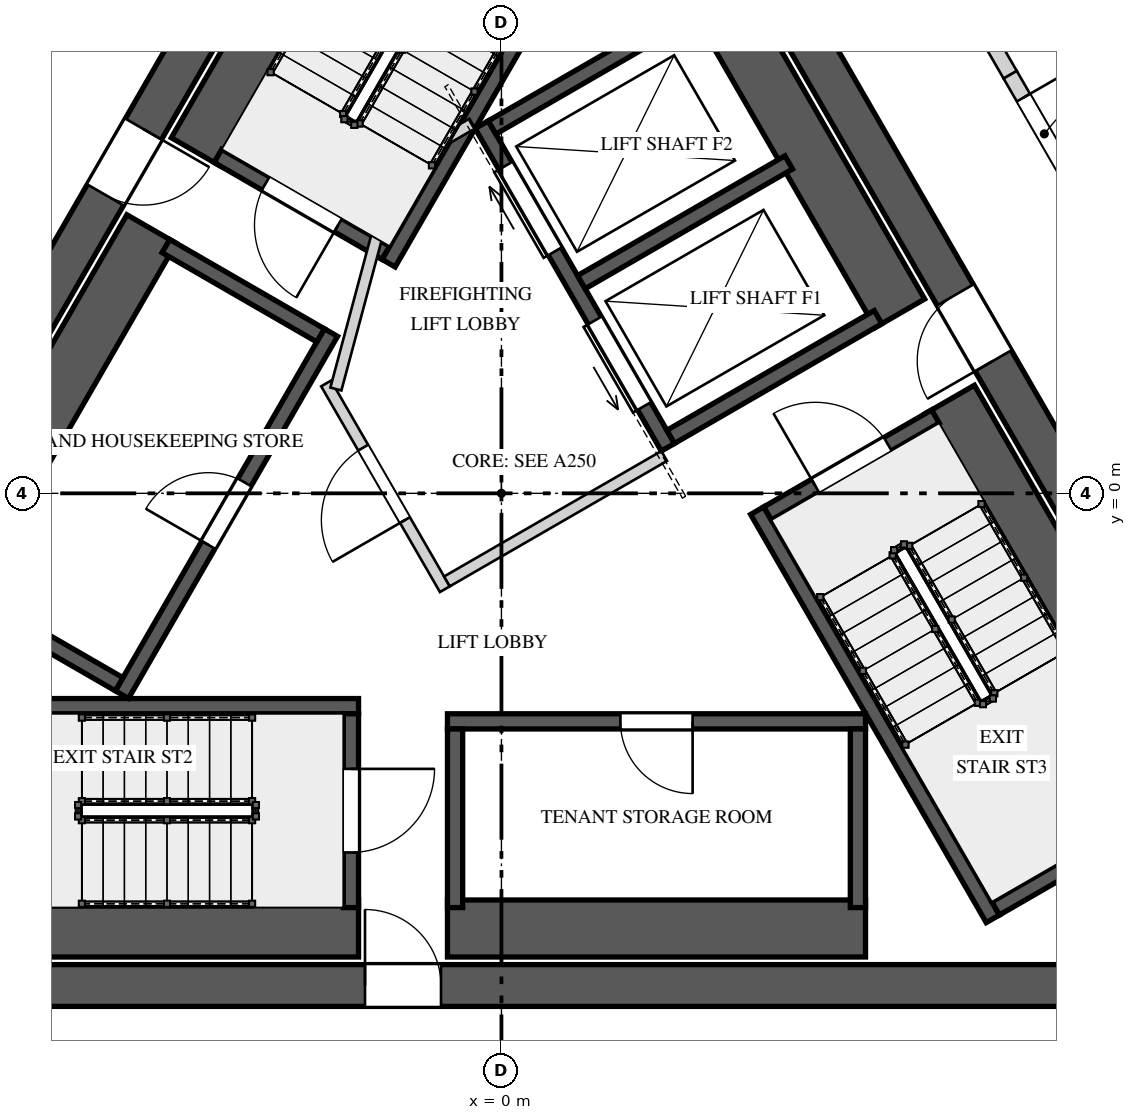
"""IFC4 building model, lengths in metres.
Left out: names, types, materials, properties, quantities, classifications, styles, units other than length and angle.
Written with IfcOpenShell. Run it as: python <this file> out.ifc"""

import sys

from ifc_helpers import new_model, si_unit, direction, frame, frame_2d, origin, place, context, subcontext, project, spatial, polyline, rectangle, outline, extrude, element, fill, save


model = new_model("IFC4")
c1 = context("Model", 3, precision=1e-05, world=origin(), true_north=direction((0.0, 1.0)))
c2 = subcontext(c1, "Body", "Model", "MODEL_VIEW")
j1 = project(units=[si_unit("LENGTHUNIT", "METRE"), si_unit("PLANEANGLEUNIT", "RADIAN")], contexts=[c1])
p1 = place(None, origin())
s1 = spatial("IfcSite", under=j1, at=p1, CompositionType="ELEMENT")
p2 = place(p1, origin())
s2 = spatial("IfcBuilding", under=s1, at=p2, CompositionType="ELEMENT")
p3 = place(p2, frame((0.0, 0.0, 374.9)))
s3 = spatial("IfcBuildingStorey", under=s2, at=p3, CompositionType="ELEMENT", Elevation=374.9)
p4 = place(p3, frame((-1.285, 10.725, 0.0), z_axis=(0.0, 0.0, 1.0), x_axis=(-0.499994590896, -0.86602852671, 0.0)))
e1 = element("IfcWall", 1, at=p4, inside=s3, PredefinedType="SHEAR", context=c2, shape_type="SweptSolid", body=[
    extrude(rectangle(XDim=17.292, YDim=0.55, at=frame_2d((8.646, 0.0))), origin(), (0.0, 0.0, 1.0), 6.0),
])
p5 = place(p4, frame((6.851, 0.0, 0.0)))
e2 = element("IfcOpeningElement", 2, at=p5, cuts=e1, PredefinedType="OPENING", context=c2, shape_type="SweptSolid", body=[
    extrude(rectangle(XDim=1.0, YDim=2.4, at=frame_2d((0.5, 1.2))), frame((0.0, 0.285, 0.0), z_axis=(0.0, -1.0, 0.0), x_axis=(1.0, 0.0, 0.0)), (0.0, 0.0, 1.0), 0.57),
])
p6 = place(p4, frame((15.089, 0.0, 0.0)))
e3 = element("IfcOpeningElement", 3, at=p6, cuts=e1, PredefinedType="OPENING", context=c2, shape_type="SweptSolid", body=[
    extrude(rectangle(XDim=0.8, YDim=2.1, at=frame_2d((0.4, 1.05))), frame((0.0, 0.285, 0.0), z_axis=(0.0, -1.0, 0.0), x_axis=(1.0, 0.0, 0.0)), (0.0, 0.0, 1.0), 0.57),
])
p7 = place(p3, frame((-8.646, -6.475, 0.0), z_axis=(0.0, 0.0, 1.0), x_axis=(1.0, 0.0, 0.0)))
e4 = element("IfcWall", 4, at=p7, inside=s3, PredefinedType="SHEAR", context=c2, shape_type="SweptSolid", body=[
    extrude(rectangle(XDim=17.292, YDim=0.55, at=frame_2d((8.646, 0.0))), origin(), (0.0, 0.0, 1.0), 6.0),
])
p8 = place(p7, frame((6.851, 0.0, 0.0)))
e5 = element("IfcOpeningElement", 5, at=p8, cuts=e4, PredefinedType="OPENING", context=c2, shape_type="SweptSolid", body=[
    extrude(rectangle(XDim=1.0, YDim=2.4, at=frame_2d((0.5, 1.2))), frame((0.0, 0.285, 0.0), z_axis=(0.0, -1.0, 0.0), x_axis=(1.0, 0.0, 0.0)), (0.0, 0.0, 1.0), 0.57),
])
p9 = place(p3, frame((9.93, -4.25, 0.0), z_axis=(0.0, 0.0, 1.0), x_axis=(-0.499994590896, 0.86602852671, 0.0)))
e6 = element("IfcWall", 6, at=p9, inside=s3, PredefinedType="SHEAR", context=c2, shape_type="SweptSolid", body=[
    extrude(rectangle(XDim=17.292, YDim=0.55, at=frame_2d((8.646, 0.0))), origin(), (0.0, 0.0, 1.0), 6.0),
])
p10 = place(p9, frame((6.921, 0.0, 0.0)))
e7 = element("IfcOpeningElement", 7, at=p10, cuts=e6, PredefinedType="OPENING", context=c2, shape_type="SweptSolid", body=[
    extrude(rectangle(XDim=1.0, YDim=2.4, at=frame_2d((0.5, 1.2))), frame((0.0, 0.285, 0.0), z_axis=(0.0, -1.0, 0.0), x_axis=(1.0, 0.0, 0.0)), (0.0, 0.0, 1.0), 0.57),
])
p11 = place(p3, frame((-0.918, 9.86, 0.0), z_axis=(0.0, 0.0, 1.0), x_axis=(-0.500026960575, -0.86600983753, 0.0)))
e8 = element("IfcWall", 8, at=p11, inside=s3, PredefinedType="SOLIDWALL", context=c2, shape_type="SweptSolid", body=[
    extrude(rectangle(XDim=6.2, YDim=0.75, at=frame_2d((3.1, 0.0))), origin(), (0.0, 0.0, 1.0), 5.65),
])
p12 = place(p3, frame((1.615, 8.397, 0.0), z_axis=(0.0, 0.0, 1.0), x_axis=(-0.500009909098, -0.866019682689, 0.0)))
e9 = element("IfcWall", 9, at=p12, inside=s3, PredefinedType="SOLIDWALL", context=c2, shape_type="SweptSolid", body=[
    extrude(rectangle(XDim=6.2, YDim=0.2, at=frame_2d((3.1, 0.0))), origin(), (0.0, 0.0, 1.0), 5.65),
])
p13 = place(p3, frame((-1.521, 3.165, 0.0), z_axis=(0.0, 0.0, 1.0), x_axis=(-0.866030925526, 0.499990435942, 0.0)))
e10 = element("IfcWall", 10, at=p13, inside=s3, PredefinedType="SOLIDWALL", context=c2, shape_type="SweptSolid", body=[
    extrude(rectangle(XDim=2.55, YDim=0.2, at=frame_2d((1.275, 0.0))), origin(), (0.0, 0.0, 1.0), 5.65),
])
p14 = place(p13, frame((0.725, 0.0, 0.0)))
e11 = element("IfcOpeningElement", 11, at=p14, cuts=e10, PredefinedType="OPENING", context=c2, shape_type="SweptSolid", body=[
    extrude(rectangle(XDim=1.1, YDim=2.4, at=frame_2d((0.55, 1.2))), frame((0.0, 0.11, 0.0), z_axis=(0.0, -1.0, 0.0), x_axis=(1.0, 0.0, 0.0)), (0.0, 0.0, 1.0), 0.22),
])
p15 = place(p3, frame((-8.08, -5.725, 0.0), z_axis=(0.0, 0.0, 1.0), x_axis=(1.0, 0.0, 0.0)))
e12 = element("IfcWall", 12, at=p15, inside=s3, PredefinedType="SOLIDWALL", context=c2, shape_type="SweptSolid", body=[
    extrude(rectangle(XDim=6.2, YDim=0.75, at=frame_2d((3.1, 0.0))), origin(), (0.0, 0.0, 1.0), 5.65),
])
p16 = place(p3, frame((-8.08, -2.8, 0.0), z_axis=(0.0, 0.0, 1.0), x_axis=(1.0, 0.0, 0.0)))
e13 = element("IfcWall", 13, at=p16, inside=s3, PredefinedType="SOLIDWALL", context=c2, shape_type="SweptSolid", body=[
    extrude(rectangle(XDim=6.2, YDim=0.2, at=frame_2d((3.1, 0.0))), origin(), (0.0, 0.0, 1.0), 5.65),
])
p17 = place(p3, frame((-1.98, -2.9, 0.0), z_axis=(0.0, 0.0, 1.0), x_axis=(0.0, -1.0, 0.0)))
e14 = element("IfcWall", 14, at=p17, inside=s3, PredefinedType="SOLIDWALL", context=c2, shape_type="SweptSolid", body=[
    extrude(rectangle(XDim=2.55, YDim=0.2, at=frame_2d((1.275, 0.0))), origin(), (0.0, 0.0, 1.0), 5.65),
])
p18 = place(p17, frame((0.725, 0.0, 0.0)))
e15 = element("IfcOpeningElement", 15, at=p18, cuts=e14, PredefinedType="OPENING", context=c2, shape_type="SweptSolid", body=[
    extrude(rectangle(XDim=1.1, YDim=2.4, at=frame_2d((0.55, 1.2))), frame((0.0, 0.11, 0.0), z_axis=(0.0, -1.0, 0.0), x_axis=(1.0, 0.0, 0.0)), (0.0, 0.0, 1.0), 0.22),
])
p19 = place(p3, frame((8.998, -4.135, 0.0), z_axis=(0.0, 0.0, 1.0), x_axis=(-0.500009909098, 0.866019682689, 0.0)))
e16 = element("IfcWall", 16, at=p19, inside=s3, PredefinedType="SOLIDWALL", context=c2, shape_type="SweptSolid", body=[
    extrude(rectangle(XDim=6.2, YDim=0.75, at=frame_2d((3.1, 0.0))), origin(), (0.0, 0.0, 1.0), 5.65),
])
p20 = place(p3, frame((6.465, -5.597, 0.0), z_axis=(0.0, 0.0, 1.0), x_axis=(-0.49998037582, 0.866036733513, 0.0)))
e17 = element("IfcWall", 17, at=p20, inside=s3, PredefinedType="SOLIDWALL", context=c2, shape_type="SweptSolid", body=[
    extrude(rectangle(XDim=6.2, YDim=0.2, at=frame_2d((3.1, 0.0))), origin(), (0.0, 0.0, 1.0), 5.65),
])
p21 = place(p3, frame((6.501, -5.461, 0.0), z_axis=(0.0, 0.0, 1.0), x_axis=(0.865989465428, 0.500062241894, 0.0)))
e18 = element("IfcWall", 18, at=p21, inside=s3, PredefinedType="SOLIDWALL", context=c2, shape_type="SweptSolid", body=[
    extrude(rectangle(XDim=2.55, YDim=0.2, at=frame_2d((1.275, 0.0))), origin(), (0.0, 0.0, 1.0), 5.65),
])
p22 = place(p3, frame((3.501, -0.265, 0.0), z_axis=(0.0, 0.0, 1.0), x_axis=(0.866030925526, 0.499990435942, 0.0)))
e19 = element("IfcWall", 19, at=p22, inside=s3, PredefinedType="SOLIDWALL", context=c2, shape_type="SweptSolid", body=[
    extrude(rectangle(XDim=2.55, YDim=0.2, at=frame_2d((1.275, 0.0))), origin(), (0.0, 0.0, 1.0), 5.65),
])
p23 = place(p22, frame((0.725, 0.0, 0.0)))
e20 = element("IfcOpeningElement", 20, at=p23, cuts=e19, PredefinedType="OPENING", context=c2, shape_type="SweptSolid", body=[
    extrude(rectangle(XDim=1.1, YDim=2.4, at=frame_2d((0.55, 1.2))), frame((0.0, 0.11, 0.0), z_axis=(0.0, -1.0, 0.0), x_axis=(1.0, 0.0, 0.0)), (0.0, 0.0, 1.0), 0.22),
])
p24 = place(p3, frame((-4.993, -2.648, 0.0), z_axis=(0.0, 0.0, 1.0), x_axis=(0.499996545922, 0.866027397988, 0.0)))
e21 = element("IfcWall", 21, at=p24, inside=s3, PredefinedType="SOLIDWALL", context=c2, shape_type="SweptSolid", body=[
    extrude(rectangle(XDim=5.5, YDim=0.2, at=frame_2d((2.75, 0.0))), origin(), (0.0, 0.0, 1.0), 5.65),
])
p25 = place(p24, frame((2.275, 0.0, 0.0)))
e22 = element("IfcOpeningElement", 22, at=p25, cuts=e21, PredefinedType="OPENING", context=c2, shape_type="SweptSolid", body=[
    extrude(rectangle(XDim=0.95, YDim=2.4, at=frame_2d((0.475, 1.2))), frame((0.0, 0.11, 0.0), z_axis=(0.0, -1.0, 0.0), x_axis=(1.0, 0.0, 0.0)), (0.0, 0.0, 1.0), 0.22),
])
p26 = place(p3, frame((-4.603, 3.477, 0.0), z_axis=(0.0, 0.0, 1.0), x_axis=(-0.500015767406, -0.866016300277, 0.0)))
e23 = element("IfcWall", 23, at=p26, inside=s3, PredefinedType="SOLIDWALL", context=c2, shape_type="SweptSolid", body=[
    extrude(rectangle(XDim=5.5, YDim=0.75, at=frame_2d((2.75, 0.0))), origin(), (0.0, 0.0, 1.0), 5.65),
])
p27 = place(p3, frame((-2.38, 2.078, 0.0), z_axis=(0.0, 0.0, 1.0), x_axis=(-0.866061024631, 0.499938297808, 0.0)))
e24 = element("IfcWall", 24, at=p27, inside=s3, PredefinedType="SOLIDWALL", context=c2, shape_type="SweptSolid", body=[
    extrude(rectangle(XDim=2.35, YDim=0.2, at=frame_2d((1.175, 0.0))), origin(), (0.0, 0.0, 1.0), 5.65),
])
p28 = place(p3, frame((-5.03, -2.512, 0.0), z_axis=(0.0, 0.0, 1.0), x_axis=(-0.866016039709, 0.500016218704, 0.0)))
e25 = element("IfcWall", 25, at=p28, inside=s3, PredefinedType="SOLIDWALL", context=c2, shape_type="SweptSolid", body=[
    extrude(rectangle(XDim=2.35, YDim=0.2, at=frame_2d((1.175, 0.0))), origin(), (0.0, 0.0, 1.0), 5.65),
])
p29 = place(p3, frame((4.79, -3.0, 0.0), z_axis=(0.0, 0.0, 1.0), x_axis=(-1.0, 0.0, 0.0)))
e26 = element("IfcWall", 26, at=p29, inside=s3, PredefinedType="SOLIDWALL", context=c2, shape_type="SweptSolid", body=[
    extrude(rectangle(XDim=5.5, YDim=0.2, at=frame_2d((2.75, 0.0))), origin(), (0.0, 0.0, 1.0), 5.65),
])
p30 = place(p29, frame((2.275, 0.0, 0.0)))
e27 = element("IfcOpeningElement", 27, at=p30, cuts=e26, PredefinedType="OPENING", context=c2, shape_type="SweptSolid", body=[
    extrude(rectangle(XDim=0.95, YDim=2.4, at=frame_2d((0.475, 1.2))), frame((0.0, 0.11, 0.0), z_axis=(0.0, -1.0, 0.0), x_axis=(1.0, 0.0, 0.0)), (0.0, 0.0, 1.0), 0.22),
])
p31 = place(p3, frame((-0.71, -5.725, 0.0), z_axis=(0.0, 0.0, 1.0), x_axis=(1.0, 0.0, 0.0)))
e28 = element("IfcWall", 28, at=p31, inside=s3, PredefinedType="SOLIDWALL", context=c2, shape_type="SweptSolid", body=[
    extrude(rectangle(XDim=5.5, YDim=0.75, at=frame_2d((2.75, 0.0))), origin(), (0.0, 0.0, 1.0), 5.65),
])
for number, where, z_axis, x_axis in (
    (29, (-0.61, -3.1, 0.0), (0.0, 0.0, 1.0), (0.0, -1.0, 0.0)),
    (30, (4.69, -3.1, 0.0), (0.0, 0.0, 1.0), (0.0, -1.0, 0.0)),
):
    element("IfcWall", number, at=place(p3, frame(where, z_axis=z_axis, x_axis=x_axis)), inside=s3, PredefinedType="SOLIDWALL", context=c2, shape_type="SweptSolid", body=[
        extrude(rectangle(XDim=2.35, YDim=0.2, at=frame_2d((1.175, 0.0))), origin(), (0.0, 0.0, 1.0), 5.65),
    ])
p32 = place(p3, frame((2.19, 0.606, 0.0), z_axis=(0.0, 0.0, 1.0), x_axis=(-0.500002801628, 0.866023786258, 0.0)))
e31 = element("IfcWall", 31, at=p32, inside=s3, PredefinedType="SOLIDWALL", context=c2, shape_type="SweptSolid", body=[
    extrude(rectangle(XDim=4.9, YDim=0.2, at=frame_2d((2.45, 0.0))), origin(), (0.0, 0.0, 1.0), 5.65),
])
p33 = place(p32, frame((0.625, 0.0, 0.0)))
e32 = element("IfcOpeningElement", 32, at=p33, cuts=e31, PredefinedType="OPENING", context=c2, shape_type="SweptSolid", body=[
    extrude(rectangle(XDim=1.3, YDim=2.1, at=frame_2d((0.65, 1.05))), frame((0.0, 0.11, 0.0), z_axis=(0.0, -1.0, 0.0), x_axis=(1.0, 0.0, 0.0)), (0.0, 0.0, 1.0), 0.22),
])
p34 = place(p32, frame((2.975, 0.0, 0.0)))
e33 = element("IfcOpeningElement", 33, at=p34, cuts=e31, PredefinedType="OPENING", context=c2, shape_type="SweptSolid", body=[
    extrude(rectangle(XDim=1.3, YDim=2.1, at=frame_2d((0.65, 1.05))), frame((0.0, 0.11, 0.0), z_axis=(0.0, -1.0, 0.0), x_axis=(1.0, 0.0, 0.0)), (0.0, 0.0, 1.0), 0.22),
])
p35 = place(p3, frame((5.243, 2.369, 0.0), z_axis=(0.0, 0.0, 1.0), x_axis=(-0.500002801628, 0.866023786258, 0.0)))
e34 = element("IfcWall", 34, at=p35, inside=s3, PredefinedType="SOLIDWALL", context=c2, shape_type="SweptSolid", body=[
    extrude(rectangle(XDim=4.9, YDim=0.75, at=frame_2d((2.45, 0.0))), origin(), (0.0, 0.0, 1.0), 5.65),
])
for number, where, z_axis, x_axis in (
    (35, (2.227, 0.743, 0.0), (0.0, 0.0, 1.0), (0.866, 0.5, 0.0)),
    (36, (1.052, 2.778, 0.0), (0.0, 0.0, 1.0), (0.866, 0.5, 0.0)),
    (37, (-0.123, 4.813, 0.0), (0.0, 0.0, 1.0), (0.866, 0.5, 0.0)),
):
    element("IfcWall", number, at=place(p3, frame(where, z_axis=z_axis, x_axis=x_axis)), inside=s3, PredefinedType="SOLIDWALL", context=c2, shape_type="SweptSolid", body=[
        extrude(rectangle(XDim=3.15, YDim=0.2, at=frame_2d((1.575, 0.0))), origin(), (0.0, 0.0, 1.0), 5.65),
    ])
p36 = place(p3, frame((-0.744, -1.261, 0.0), z_axis=(0.0, 0.0, 1.0), x_axis=(-0.500004234368, 0.866022959057, 0.0)))
e38 = element("IfcWall", 38, at=p36, inside=s3, PredefinedType="PARTITIONING", context=c2, shape_type="SweptSolid", body=[
    extrude(rectangle(XDim=3.125, YDim=0.15, at=frame_2d((1.562, 0.0))), origin(), (0.0, 0.0, 1.0), 5.65),
])
p37 = place(p36, frame((1.05, 0.0, 0.0)))
e39 = element("IfcOpeningElement", 39, at=p37, cuts=e38, PredefinedType="OPENING", context=c2, shape_type="SweptSolid", body=[
    extrude(rectangle(XDim=1.1, YDim=2.4, at=frame_2d((0.55, 1.2))), frame((0.0, 0.085, 0.0), z_axis=(0.0, -1.0, 0.0), x_axis=(1.0, 0.0, 0.0)), (0.0, 0.0, 1.0), 0.17),
])
p38 = place(p3, frame((-0.717, -1.159, 0.0), z_axis=(0.0, 0.0, 1.0), x_axis=(0.866008176907, 0.50002983664, 0.0)))
e40 = element("IfcWall", 40, at=p38, inside=s3, PredefinedType="PARTITIONING", context=c2, shape_type="SweptSolid", body=[
    extrude(rectangle(XDim=3.3, YDim=0.15, at=frame_2d((1.65, 0.0))), origin(), (0.0, 0.0, 1.0), 5.65),
])
p39 = place(p3, frame((-2.178, 1.372, 0.0), z_axis=(0.0, 0.0, 1.0), x_axis=(0.258808958833, 0.96592852884, 0.0)))
e41 = element("IfcWall", 41, at=p39, inside=s3, PredefinedType="PARTITIONING", context=c2, shape_type="SweptSolid", body=[
    extrude(rectangle(XDim=2.903, YDim=0.15, at=frame_2d((1.451, 0.0))), origin(), (0.0, 0.0, 1.0), 5.65),
])
p40 = place(p3, frame((-1.51, 4.215, 0.0), z_axis=(0.0, 0.0, 1.0), x_axis=(0.866085525409, 0.49989585183, 0.0)))
e42 = element("IfcWall", 42, at=p40, inside=s3, PredefinedType="PARTITIONING", context=c2, shape_type="SweptSolid", body=[
    extrude(rectangle(XDim=1.3, YDim=0.15, at=frame_2d((0.65, 0.0))), origin(), (0.0, 0.0, 1.0), 5.65),
])
p41 = place(p3, frame((-6.64, 5.599, 0.0), z_axis=(0.0, 0.0, 1.0), x_axis=(0.49996417229, 0.866046087934, 0.0)))
e43 = element("IfcWall", 43, at=p41, inside=s3, PredefinedType="SOLIDWALL", context=c2, shape_type="SweptSolid", body=[
    extrude(rectangle(XDim=3.206, YDim=0.2, at=frame_2d((1.603, 0.0))), origin(), (0.0, 0.0, 1.0), 5.65),
])
p42 = place(p3, frame((6.29, 6.205, 0.0), z_axis=(0.0, 0.0, 1.0), x_axis=(0.500045602705, -0.86599907345, 0.0)))
e44 = element("IfcWall", 44, at=p42, inside=s3, PredefinedType="SOLIDWALL", context=c2, shape_type="SweptSolid", body=[
    extrude(rectangle(XDim=0.807, YDim=0.2, at=frame_2d((0.403, 0.0))), origin(), (0.0, 0.0, 1.0), 5.65),
])
p43 = place(p3, frame((6.693, 5.507, 0.0), z_axis=(0.0, 0.0, 1.0), x_axis=(0.499995192696, -0.866028179265, 0.0)))
e45 = element("IfcWall", 45, at=p43, inside=s3, PredefinedType="SOLIDWALL", context=c2, shape_type="SweptSolid", body=[
    extrude(outline(polyline([(0.0, 0.0), (1.498, 0.0), (1.498, 5.65), (0.906, 5.65), (0.906, 4.55), (0.0, 4.55), (0.0, 0.0)])), frame((0.0, 0.1, 0.0), z_axis=(0.0, -1.0, 0.0), x_axis=(1.0, 0.0, 0.0)), (0.0, 0.0, 1.0), 0.2),
])
p44 = place(p43, frame((0.348, 0.0, 0.0)))
e46 = element("IfcOpeningElement", 46, at=p44, cuts=e45, PredefinedType="OPENING", context=c2, shape_type="SweptSolid", body=[
    extrude(rectangle(XDim=1.1, YDim=2.4, at=frame_2d((0.55, 1.2))), frame((0.0, 0.11, 0.0), z_axis=(0.0, -1.0, 0.0), x_axis=(1.0, 0.0, 0.0)), (0.0, 0.0, 1.0), 0.22),
])
p45 = place(p14, origin())
e47 = element("IfcDoor", 47, at=p45, inside=s3, OperationType="SINGLE_SWING_RIGHT", PredefinedType="DOOR", context=c2, shape_type="SweptSolid", body=[
    extrude(rectangle(XDim=1.1, YDim=2.4, at=frame_2d((0.55, 1.2))), frame((0.0, 0.025, 0.0), z_axis=(0.0, -1.0, 0.0), x_axis=(1.0, 0.0, 0.0)), (0.0, 0.0, 1.0), 0.05),
])
fill(e11, e47)
p46 = place(p18, origin())
e48 = element("IfcDoor", 48, at=p46, inside=s3, OperationType="SINGLE_SWING_LEFT", PredefinedType="DOOR", context=c2, shape_type="SweptSolid", body=[
    extrude(rectangle(XDim=1.1, YDim=2.4, at=frame_2d((0.55, 1.2))), frame((0.0, 0.025, 0.0), z_axis=(0.0, -1.0, 0.0), x_axis=(1.0, 0.0, 0.0)), (0.0, 0.0, 1.0), 0.05),
])
fill(e15, e48)
p47 = place(p23, origin())
e49 = element("IfcDoor", 49, at=p47, inside=s3, OperationType="SINGLE_SWING_RIGHT", PredefinedType="DOOR", context=c2, shape_type="SweptSolid", body=[
    extrude(rectangle(XDim=1.1, YDim=2.4, at=frame_2d((0.55, 1.2))), frame((0.0, 0.025, 0.0), z_axis=(0.0, -1.0, 0.0), x_axis=(1.0, 0.0, 0.0)), (0.0, 0.0, 1.0), 0.05),
])
fill(e20, e49)
p48 = place(p25, origin())
e50 = element("IfcDoor", 50, at=p48, inside=s3, OperationType="SINGLE_SWING_LEFT", PredefinedType="DOOR", context=c2, shape_type="SweptSolid", body=[
    extrude(rectangle(XDim=0.95, YDim=2.4, at=frame_2d((0.475, 1.2))), frame((0.0, 0.025, 0.0), z_axis=(0.0, -1.0, 0.0), x_axis=(1.0, 0.0, 0.0)), (0.0, 0.0, 1.0), 0.05),
])
fill(e22, e50)
p49 = place(p30, origin())
e51 = element("IfcDoor", 51, at=p49, inside=s3, OperationType="SINGLE_SWING_RIGHT", PredefinedType="DOOR", context=c2, shape_type="SweptSolid", body=[
    extrude(rectangle(XDim=0.95, YDim=2.4, at=frame_2d((0.475, 1.2))), frame((0.0, 0.025, 0.0), z_axis=(0.0, -1.0, 0.0), x_axis=(1.0, 0.0, 0.0)), (0.0, 0.0, 1.0), 0.05),
])
fill(e27, e51)
p50 = place(p33, origin())
e52 = element("IfcDoor", 52, at=p50, inside=s3, OperationType="SLIDING_TO_LEFT", PredefinedType="DOOR", context=c2, shape_type="SweptSolid", body=[
    extrude(rectangle(XDim=1.3, YDim=2.1, at=frame_2d((0.65, 1.05))), frame((0.0, 0.025, 0.0), z_axis=(0.0, -1.0, 0.0), x_axis=(1.0, 0.0, 0.0)), (0.0, 0.0, 1.0), 0.05),
])
fill(e32, e52)
p51 = place(p34, origin())
e53 = element("IfcDoor", 53, at=p51, inside=s3, OperationType="SLIDING_TO_RIGHT", PredefinedType="DOOR", context=c2, shape_type="SweptSolid", body=[
    extrude(rectangle(XDim=1.3, YDim=2.1, at=frame_2d((0.65, 1.05))), frame((0.0, 0.025, 0.0), z_axis=(0.0, -1.0, 0.0), x_axis=(1.0, 0.0, 0.0)), (0.0, 0.0, 1.0), 0.05),
])
fill(e33, e53)
p52 = place(p37, origin())
e54 = element("IfcDoor", 54, at=p52, inside=s3, OperationType="SINGLE_SWING_LEFT", PredefinedType="DOOR", context=c2, shape_type="SweptSolid", body=[
    extrude(rectangle(XDim=1.1, YDim=2.4, at=frame_2d((0.55, 1.2))), frame((0.0, 0.025, 0.0), z_axis=(0.0, -1.0, 0.0), x_axis=(1.0, 0.0, 0.0)), (0.0, 0.0, 1.0), 0.05),
])
fill(e39, e54)
p53 = place(p5, origin())
e55 = element("IfcDoor", 55, at=p53, inside=s3, OperationType="SINGLE_SWING_RIGHT", PredefinedType="DOOR", context=c2, shape_type="SweptSolid", body=[
    extrude(rectangle(XDim=1.0, YDim=2.4, at=frame_2d((0.5, 1.2))), frame((0.0, 0.025, 0.0), z_axis=(0.0, -1.0, 0.0), x_axis=(1.0, 0.0, 0.0)), (0.0, 0.0, 1.0), 0.05),
])
fill(e2, e55)
p54 = place(p8, origin())
e56 = element("IfcDoor", 56, at=p54, inside=s3, OperationType="SINGLE_SWING_LEFT", PredefinedType="DOOR", context=c2, shape_type="SweptSolid", body=[
    extrude(rectangle(XDim=1.0, YDim=2.4, at=frame_2d((0.5, 1.2))), frame((0.0, 0.025, 0.0), z_axis=(0.0, -1.0, 0.0), x_axis=(1.0, 0.0, 0.0)), (0.0, 0.0, 1.0), 0.05),
])
fill(e5, e56)
p55 = place(p10, origin())
e57 = element("IfcDoor", 57, at=p55, inside=s3, OperationType="SINGLE_SWING_RIGHT", PredefinedType="DOOR", context=c2, shape_type="SweptSolid", body=[
    extrude(rectangle(XDim=1.0, YDim=2.4, at=frame_2d((0.5, 1.2))), frame((0.0, 0.025, 0.0), z_axis=(0.0, -1.0, 0.0), x_axis=(1.0, 0.0, 0.0)), (0.0, 0.0, 1.0), 0.05),
])
fill(e7, e57)
p56 = place(p44, origin())
e58 = element("IfcDoor", 58, at=p56, inside=s3, OperationType="SINGLE_SWING_LEFT", PredefinedType="DOOR", context=c2, shape_type="SweptSolid", body=[
    extrude(rectangle(XDim=1.1, YDim=2.4, at=frame_2d((0.55, 1.2))), frame((0.0, 0.025, 0.0), z_axis=(0.0, -1.0, 0.0), x_axis=(1.0, 0.0, 0.0)), (0.0, 0.0, 1.0), 0.05),
])
fill(e46, e58)
save(model, sys.argv[1])
